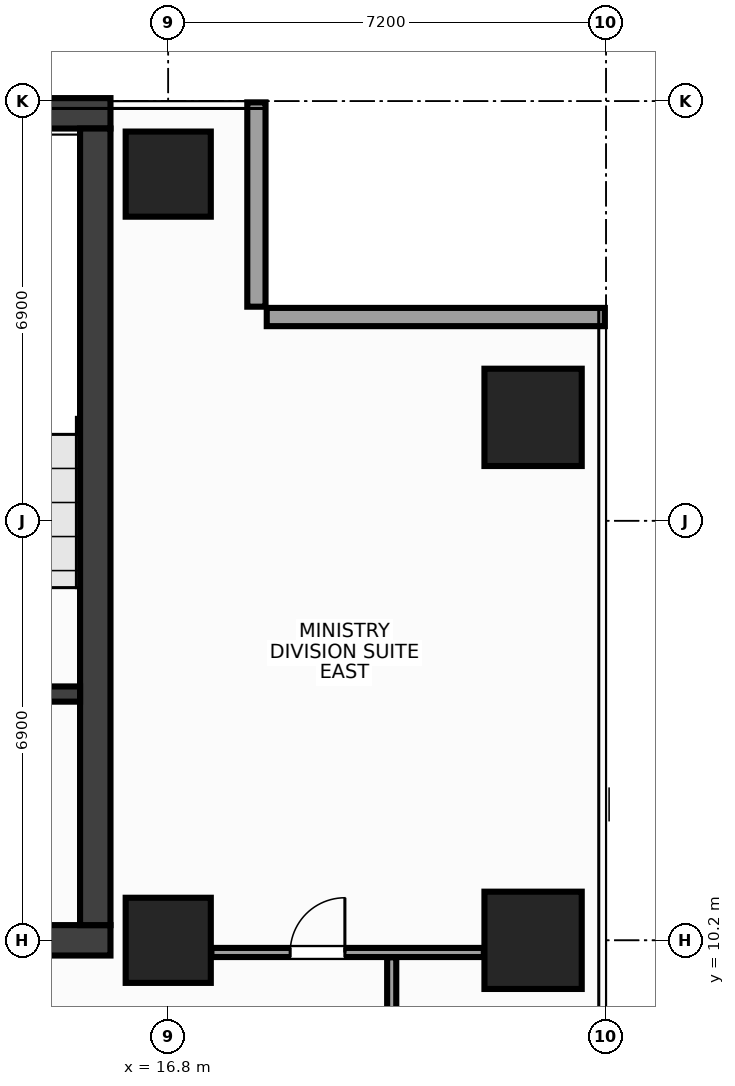
"""IFC4 building model, lengths in metres.
Left out: names, types, materials, properties, quantities, classifications, styles, units other than length and angle.
Written with IfcOpenShell. Run it as: python <this file> out.ifc"""

import sys

from ifc_helpers import new_model, si_unit, direction, frame, frame_2d, origin, origin_2d, place, context, subcontext, project, spatial, rectangle, extrude, source, transform, mapped, element, fill, save


model = new_model("IFC4")
c1 = context("Model", 3, precision=1e-05, world=origin(), true_north=direction((0.0, 1.0)))
c2 = subcontext(c1, "Body", "Model", "MODEL_VIEW")
j1 = project(units=[si_unit("LENGTHUNIT", "METRE"), si_unit("PLANEANGLEUNIT", "RADIAN")], contexts=[c1])
p1 = place(None, origin())
s1 = spatial("IfcSite", under=j1, at=p1, CompositionType="ELEMENT")
p2 = place(p1, origin())
s2 = spatial("IfcBuilding", under=s1, at=p2, CompositionType="ELEMENT")
p3 = place(p2, frame((0.0, 0.0, 207.2)))
s3 = spatial("IfcBuildingStorey", under=s2, at=p3, CompositionType="ELEMENT", Elevation=207.2)
m1 = source(origin(), c2, "Body", "SweptSolid", [
    extrude(rectangle(XDim=31.7, YDim=0.5, at=frame_2d((15.85, 0.0))), origin(), (0.0, 0.0, 1.0), 3.6),
])
p4 = place(p3, frame((-15.85, 23.8, 0.0), z_axis=(0.0, 0.0, 1.0), x_axis=(1.0, 0.0, 0.0)))
e1 = element("IfcWall", 1, at=p4, inside=s3, PredefinedType="SHEAR", context=c2, shape_type="MappedRepresentation", body=[
    mapped(m1, transform((0.0, 0.0, 0.0), x_axis=(1.0, 0.0, 0.0), y_axis=(0.0, 1.0, 0.0), z_axis=(0.0, 0.0, 1.0), scale=1.0)),
])
p5 = place(p3, frame((-15.85, 10.2, 0.0), z_axis=(0.0, 0.0, 1.0), x_axis=(1.0, 0.0, 0.0)))
e2 = element("IfcWall", 2, at=p5, inside=s3, PredefinedType="SHEAR", context=c2, shape_type="MappedRepresentation", body=[
    mapped(m1, transform((0.0, 0.0, 0.0), x_axis=(1.0, 0.0, 0.0), y_axis=(0.0, 1.0, 0.0), z_axis=(0.0, 0.0, 1.0), scale=1.0)),
])
p6 = place(p5, frame((1.7, 0.0, 0.0)))
e3 = element("IfcOpeningElement", 3, at=p6, cuts=e2, PredefinedType="OPENING", context=c2, shape_type="SweptSolid", body=[
    extrude(rectangle(XDim=1.6, YDim=2.15, at=frame_2d((0.8, 1.075))), frame((0.0, 0.262, 0.0), z_axis=(0.0, -1.0, 0.0), x_axis=(1.0, 0.0, 0.0)), (0.0, 0.0, 1.0), 0.524),
])
p7 = place(p5, frame((28.4, 0.0, 0.0)))
e4 = element("IfcOpeningElement", 4, at=p7, cuts=e2, PredefinedType="OPENING", context=c2, shape_type="SweptSolid", body=[
    extrude(rectangle(XDim=1.6, YDim=2.15, at=frame_2d((0.8, 1.075))), frame((0.0, 0.262, 0.0), z_axis=(0.0, -1.0, 0.0), x_axis=(1.0, 0.0, 0.0)), (0.0, 0.0, 1.0), 0.524),
])
p8 = place(p5, frame((15.1, 0.0, 0.0)))
e5 = element("IfcOpeningElement", 5, at=p8, cuts=e2, PredefinedType="OPENING", context=c2, shape_type="SweptSolid", body=[
    extrude(rectangle(XDim=1.5, YDim=2.2, at=frame_2d((0.75, 1.1))), frame((0.0, 0.262, 0.0), z_axis=(0.0, -1.0, 0.0), x_axis=(1.0, 0.0, 0.0)), (0.0, 0.0, 1.0), 0.524),
])
m2 = source(origin(), c2, "Body", "SweptSolid", [
    extrude(rectangle(XDim=13.1, YDim=0.5, at=frame_2d((6.55, 0.0))), origin(), (0.0, 0.0, 1.0), 3.6),
])
p9 = place(p3, frame((15.6, 10.45, 0.0), z_axis=(0.0, 0.0, 1.0), x_axis=(0.0, 1.0, 0.0)))
e6 = element("IfcWall", 6, at=p9, inside=s3, PredefinedType="SHEAR", context=c2, shape_type="MappedRepresentation", body=[
    mapped(m2, transform((0.0, 0.0, 0.0), x_axis=(1.0, 0.0, 0.0), y_axis=(0.0, 1.0, 0.0), z_axis=(0.0, 0.0, 1.0), scale=1.0)),
])
m3 = source(origin(), c2, "Body", "SweptSolid", [
    extrude(rectangle(XDim=3.705, YDim=0.25, at=frame_2d((1.853, 0.0))), origin(), (0.0, 0.0, 1.0), 3.6),
])
p10 = place(p3, frame((11.645, 14.25, 0.0), z_axis=(0.0, 0.0, 1.0), x_axis=(1.0, 0.0, 0.0)))
e7 = element("IfcWall", 7, at=p10, inside=s3, PredefinedType="SHEAR", context=c2, shape_type="MappedRepresentation", body=[
    mapped(m3, transform((0.0, 0.0, 0.0), x_axis=(1.0, 0.0, 0.0), y_axis=(0.0, 1.0, 0.0), z_axis=(0.0, 0.0, 1.0), scale=1.0)),
])
p11 = place(p10, frame((0.95, 0.0, 0.0)))
e8 = element("IfcOpeningElement", 8, at=p11, cuts=e7, PredefinedType="OPENING", context=c2, shape_type="SweptSolid", body=[
    extrude(rectangle(XDim=1.6, YDim=2.15, at=frame_2d((0.8, 1.075))), frame((0.0, 0.137, 0.0), z_axis=(0.0, -1.0, 0.0), x_axis=(1.0, 0.0, 0.0)), (0.0, 0.0, 1.0), 0.274),
])
m4 = source(origin(), c2, "Body", "SweptSolid", [
    extrude(rectangle(XDim=1.4, YDim=1.4, at=origin_2d()), origin(), (0.0, 0.0, 1.0), 3.6),
])
for number, where, z_axis, x_axis in (
    (9, (16.8, 10.2, 0.0), (0.0, 0.0, 1.0), (1.0, 0.0, 0.0)),
    (10, (16.8, 22.8, 0.0), (0.0, 0.0, 1.0), (1.0, 0.0, 0.0)),
):
    element("IfcColumn", number, at=place(p3, frame(where, z_axis=z_axis, x_axis=x_axis)), inside=s3, PredefinedType="COLUMN", context=c2, shape_type="MappedRepresentation", body=[
        mapped(m4, transform((0.0, 0.0, 0.0), x_axis=(1.0, 0.0, 0.0), y_axis=(0.0, 1.0, 0.0), z_axis=(0.0, 0.0, 1.0), scale=1.0)),
    ])
m5 = source(origin(), c2, "Body", "SweptSolid", [
    extrude(rectangle(XDim=1.6, YDim=1.6, at=origin_2d()), origin(), (0.0, 0.0, 1.0), 3.6),
])
for number, where, z_axis, x_axis in (
    (11, (22.8, 10.2, 0.0), (0.0, 0.0, 1.0), (1.0, 0.0, 0.0)),
    (12, (22.8, 18.8, 0.0), (0.0, 0.0, 1.0), (1.0, 0.0, 0.0)),
):
    element("IfcColumn", number, at=place(p3, frame(where, z_axis=z_axis, x_axis=x_axis)), inside=s3, PredefinedType="COLUMN", context=c2, shape_type="MappedRepresentation", body=[
        mapped(m5, transform((0.0, 0.0, 0.0), x_axis=(1.0, 0.0, 0.0), y_axis=(0.0, 1.0, 0.0), z_axis=(0.0, 0.0, 1.0), scale=1.0)),
    ])
m6 = source(origin(), c2, "Body", "SweptSolid", [
    extrude(rectangle(XDim=5.56, YDim=0.3, at=frame_2d((2.78, 0.0))), origin(), (0.0, 0.0, 1.0), 2.76),
])
p12 = place(p3, frame((23.98, 20.45, 0.0), z_axis=(0.0, 0.0, 1.0), x_axis=(-1.0, 0.0, 0.0)))
e13 = element("IfcWall", 13, at=p12, inside=s3, PredefinedType="STANDARD", context=c2, shape_type="MappedRepresentation", body=[
    mapped(m6, transform((0.0, 0.0, 0.0), x_axis=(1.0, 0.0, 0.0), y_axis=(0.0, 1.0, 0.0), z_axis=(0.0, 0.0, 1.0), scale=1.0)),
])
m7 = source(origin(), c2, "Body", "SweptSolid", [
    extrude(rectangle(XDim=3.36, YDim=0.3, at=frame_2d((1.68, 0.0))), origin(), (0.0, 0.0, 1.0), 2.76),
])
p13 = place(p3, frame((18.25, 20.62, 0.0), z_axis=(0.0, 0.0, 1.0), x_axis=(0.0, 1.0, 0.0)))
e14 = element("IfcWall", 14, at=p13, inside=s3, PredefinedType="STANDARD", context=c2, shape_type="MappedRepresentation", body=[
    mapped(m7, transform((0.0, 0.0, 0.0), x_axis=(1.0, 0.0, 0.0), y_axis=(0.0, 1.0, 0.0), z_axis=(0.0, 0.0, 1.0), scale=1.0)),
])
m8 = source(origin(), c2, "Body", "SweptSolid", [
    extrude(rectangle(XDim=4.48, YDim=0.15, at=frame_2d((2.24, 0.0))), origin(), (0.0, 0.0, 1.0), 2.915),
])
p14 = place(p3, frame((17.51, 10.0, 0.0), z_axis=(0.0, 0.0, 1.0), x_axis=(1.0, 0.0, 0.0)))
e15 = element("IfcWall", 15, at=p14, inside=s3, PredefinedType="PARTITIONING", context=c2, shape_type="MappedRepresentation", body=[
    mapped(m8, transform((0.0, 0.0, 0.0), x_axis=(1.0, 0.0, 0.0), y_axis=(0.0, 1.0, 0.0), z_axis=(0.0, 0.0, 1.0), scale=1.0)),
])
p15 = place(p14, frame((1.295, 0.0, 0.0)))
e16 = element("IfcOpeningElement", 16, at=p15, cuts=e15, PredefinedType="OPENING", context=c2, shape_type="SweptSolid", body=[
    extrude(rectangle(XDim=0.9, YDim=2.15, at=frame_2d((0.45, 1.075))), frame((0.0, 0.087, 0.0), z_axis=(0.0, -1.0, 0.0), x_axis=(1.0, 0.0, 0.0)), (0.0, 0.0, 1.0), 0.174),
])
m9 = source(origin(), c2, "Body", "SweptSolid", [
    extrude(rectangle(XDim=2.365, YDim=0.15, at=frame_2d((1.183, 0.0))), origin(), (0.0, 0.0, 1.0), 3.38),
])
p16 = place(p3, frame((20.475, 7.555, 0.0), z_axis=(0.0, 0.0, 1.0), x_axis=(0.0, 1.0, 0.0)))
e17 = element("IfcWall", 17, at=p16, inside=s3, PredefinedType="PARTITIONING", context=c2, shape_type="MappedRepresentation", body=[
    mapped(m9, transform((0.0, 0.0, 0.0), x_axis=(1.0, 0.0, 0.0), y_axis=(0.0, 1.0, 0.0), z_axis=(0.0, 0.0, 1.0), scale=1.0)),
])
m10 = source(origin(), c2, "Body", "SweptSolid", [
    extrude(rectangle(XDim=0.9, YDim=2.15, at=frame_2d((0.45, 1.075))), frame((0.0, 0.025, 0.0), z_axis=(0.0, -1.0, 0.0), x_axis=(1.0, 0.0, 0.0)), (0.0, 0.0, 1.0), 0.05),
])
p17 = place(p15, origin())
e18 = element("IfcDoor", 18, at=p17, inside=s3, OperationType="SINGLE_SWING_RIGHT", PredefinedType="DOOR", context=c2, shape_type="MappedRepresentation", body=[
    mapped(m10, transform((0.0, 0.0, 0.0), x_axis=(1.0, 0.0, 0.0), y_axis=(0.0, 1.0, 0.0), z_axis=(0.0, 0.0, 1.0), scale=1.0)),
])
fill(e16, e18)
save(model, sys.argv[1])
